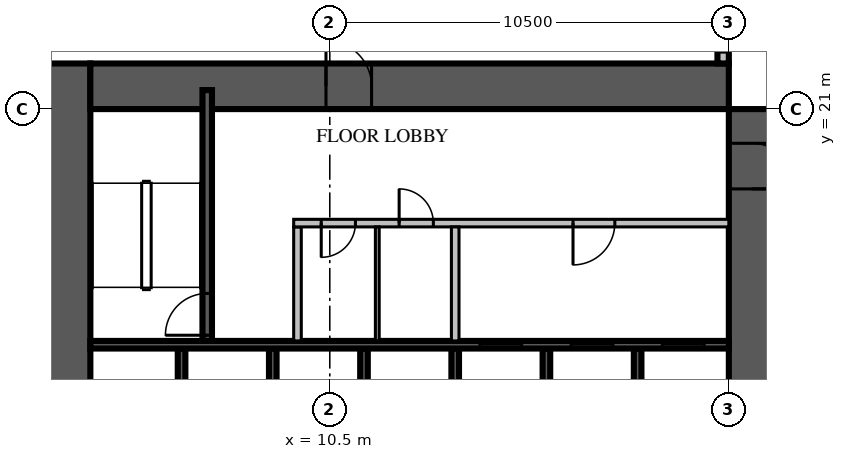
"""IFC4 building model, lengths in metres.
Left out: names, types, materials, properties, quantities, classifications, styles, units other than length and angle.
Written with IfcOpenShell. Run it as: python <this file> out.ifc"""

import sys

from ifc_helpers import new_model, si_unit, direction, frame, frame_2d, origin, place, context, subcontext, project, spatial, rectangle, extrude, source, transform, mapped, element, fill, save


model = new_model("IFC4")
c1 = context("Model", 3, precision=1e-05, world=origin(), true_north=direction((0.0, 1.0)))
c2 = subcontext(c1, "Body", "Model", "MODEL_VIEW")
j1 = project(units=[si_unit("LENGTHUNIT", "METRE"), si_unit("PLANEANGLEUNIT", "RADIAN")], contexts=[c1])
p1 = place(None, origin())
s1 = spatial("IfcSite", under=j1, at=p1, CompositionType="ELEMENT")
p2 = place(p1, origin())
s2 = spatial("IfcBuilding", under=s1, at=p2, CompositionType="ELEMENT")
p3 = place(p2, frame((0.0, 0.0, 48.9)))
s3 = spatial("IfcBuildingStorey", under=s2, at=p3, CompositionType="ELEMENT", Elevation=48.9)
m1 = source(origin(), c2, "Body", "SweptSolid", [
    extrude(rectangle(XDim=18.0, YDim=1.2, at=frame_2d((9.0, 0.0))), origin(), (0.0, 0.0, 1.0), 4.2),
])
p4 = place(p3, frame((3.6, 4.2, 0.0), z_axis=(0.0, 0.0, 1.0), x_axis=(0.0, 1.0, 0.0)))
e1 = element("IfcWall", 1, at=p4, inside=s3, PredefinedType="SHEAR", context=c2, shape_type="MappedRepresentation", body=[
    mapped(m1, transform((0.0, 0.0, 0.0), scale=1.0)),
])
m2 = source(origin(), c2, "Body", "SweptSolid", [
    extrude(rectangle(XDim=2.2, YDim=2.1, at=frame_2d((1.1, 1.05))), frame((0.0, 0.61, 0.0), z_axis=(0.0, -1.0, 0.0), x_axis=(1.0, 0.0, 0.0)), (0.0, 0.0, 1.0), 1.22),
])
p5 = place(p4, frame((4.2, 0.0, 0.0)))
e2 = element("IfcOpeningElement", 2, at=p5, cuts=e1, PredefinedType="OPENING", context=c2, shape_type="MappedRepresentation", body=[
    mapped(m2, transform((0.0, 0.0, 0.0), scale=1.0)),
])
m3 = source(origin(), c2, "Body", "SweptSolid", [
    extrude(rectangle(XDim=16.8, YDim=1.2, at=frame_2d((8.4, 0.0))), origin(), (0.0, 0.0, 1.0), 4.2),
])
p6 = place(p3, frame((21.6, 4.2, 0.0), z_axis=(0.0, 0.0, 1.0), x_axis=(0.0, 1.0, 0.0)))
e3 = element("IfcWall", 3, at=p6, inside=s3, PredefinedType="SHEAR", context=c2, shape_type="MappedRepresentation", body=[
    mapped(m3, transform((0.0, 0.0, 0.0), scale=1.0)),
])
p7 = place(p6, frame((4.2, 0.0, 0.0)))
e4 = element("IfcOpeningElement", 4, at=p7, cuts=e3, PredefinedType="OPENING", context=c2, shape_type="MappedRepresentation", body=[
    mapped(m2, transform((0.0, 0.0, 0.0), scale=1.0)),
])
m4 = source(origin(), c2, "Body", "SweptSolid", [
    extrude(rectangle(XDim=1.2, YDim=2.1, at=frame_2d((0.6, 1.05))), frame((0.0, 0.61, 0.0), z_axis=(0.0, -1.0, 0.0), x_axis=(1.0, 0.0, 0.0)), (0.0, 0.0, 1.0), 1.22),
])
p8 = place(p6, frame((14.7, 0.0, 0.0)))
e5 = element("IfcOpeningElement", 5, at=p8, cuts=e3, PredefinedType="OPENING", context=c2, shape_type="MappedRepresentation", body=[
    mapped(m4, transform((0.0, 0.0, 0.0), scale=1.0)),
])
p9 = place(p3, frame((4.2, 21.6, 0.0), z_axis=(0.0, 0.0, 1.0), x_axis=(1.0, 0.0, 0.0)))
e6 = element("IfcWall", 6, at=p9, inside=s3, PredefinedType="SHEAR", context=c2, shape_type="MappedRepresentation", body=[
    mapped(m3, transform((0.0, 0.0, 0.0), scale=1.0)),
])
p10 = place(p9, frame((6.2, 0.0, 0.0)))
e7 = element("IfcOpeningElement", 7, at=p10, cuts=e6, PredefinedType="OPENING", context=c2, shape_type="MappedRepresentation", body=[
    mapped(m4, transform((0.0, 0.0, 0.0), scale=1.0)),
])
m5 = source(origin(), c2, "Body", "SweptSolid", [
    extrude(rectangle(XDim=6.6, YDim=0.3, at=frame_2d((3.3, 0.0))), origin(), (0.0, 0.0, 1.0), 3.8),
])
p11 = place(p3, frame((20.85, 22.2, 0.0), z_axis=(0.0, 0.0, 1.0), x_axis=(0.0, 1.0, 0.0)))
e8 = element("IfcWall", 8, at=p11, inside=s3, PredefinedType="STANDARD", context=c2, shape_type="MappedRepresentation", body=[
    mapped(m5, transform((0.0, 0.0, 0.0), scale=1.0)),
])
m6 = source(origin(), c2, "Body", "SweptSolid", [
    extrude(rectangle(XDim=1.2, YDim=2.7, at=frame_2d((0.6, 1.35))), frame((0.0, 0.16, 0.0), z_axis=(0.0, -1.0, 0.0), x_axis=(1.0, 0.0, 0.0)), (0.0, 0.0, 1.0), 0.32),
])
p12 = place(p11, frame((0.3, 0.0, 0.6)))
e9 = element("IfcOpeningElement", 9, at=p12, cuts=e8, PredefinedType="OPENING", context=c2, shape_type="MappedRepresentation", body=[
    mapped(m6, transform((0.0, 0.0, 0.0), scale=1.0)),
])
m7 = source(origin(), c2, "Body", "SweptSolid", [
    extrude(rectangle(XDim=2.4, YDim=2.7, at=frame_2d((1.2, 1.35))), frame((0.0, 0.16, 0.0), z_axis=(0.0, -1.0, 0.0), x_axis=(1.0, 0.0, 0.0)), (0.0, 0.0, 1.0), 0.32),
])
p13 = place(p11, frame((3.9, 0.0, 0.6)))
e10 = element("IfcOpeningElement", 10, at=p13, cuts=e8, PredefinedType="OPENING", context=c2, shape_type="MappedRepresentation", body=[
    mapped(m7, transform((0.0, 0.0, 0.0), scale=1.0)),
])
m8 = source(origin(), c2, "Body", "SweptSolid", [
    extrude(rectangle(XDim=3.0, YDim=0.2, at=frame_2d((1.5, 0.0))), origin(), (0.0, 0.0, 1.0), 4.2),
])
for number, where, z_axis, x_axis in (
    (11, (6.6, 11.7, 0.0), (0.0, 0.0, 1.0), (0.0, 1.0, 0.0)),
    (12, (9.0, 11.7, 0.0), (0.0, 0.0, 1.0), (0.0, 1.0, 0.0)),
    (13, (11.4, 11.7, 0.0), (0.0, 0.0, 1.0), (0.0, 1.0, 0.0)),
    (14, (13.8, 11.7, 0.0), (0.0, 0.0, 1.0), (0.0, 1.0, 0.0)),
    (15, (16.2, 11.7, 0.0), (0.0, 0.0, 1.0), (0.0, 1.0, 0.0)),
    (16, (18.6, 11.7, 0.0), (0.0, 0.0, 1.0), (0.0, 1.0, 0.0)),
):
    element("IfcWall", number, at=place(p3, frame(where, z_axis=z_axis, x_axis=x_axis)), inside=s3, PredefinedType="SOLIDWALL", context=c2, shape_type="MappedRepresentation", body=[
        mapped(m8, transform((0.0, 0.0, 0.0), scale=1.0)),
    ])
m9 = source(origin(), c2, "Body", "SweptSolid", [
    extrude(rectangle(XDim=16.8, YDim=0.2, at=frame_2d((8.4, 0.0))), origin(), (0.0, 0.0, 1.0), 4.2),
])
p14 = place(p3, frame((4.2, 14.8, 0.0), z_axis=(0.0, 0.0, 1.0), x_axis=(1.0, 0.0, 0.0)))
e17 = element("IfcWall", 17, at=p14, inside=s3, PredefinedType="SOLIDWALL", context=c2, shape_type="MappedRepresentation", body=[
    mapped(m9, transform((0.0, 0.0, 0.0), scale=1.0)),
])
m10 = source(origin(), c2, "Body", "SweptSolid", [
    extrude(rectangle(XDim=1.1, YDim=2.1, at=frame_2d((0.55, 1.05))), frame((0.0, 0.11, 0.0), z_axis=(0.0, -1.0, 0.0), x_axis=(1.0, 0.0, 0.0)), (0.0, 0.0, 1.0), 0.22),
])
p15 = place(p14, frame((10.25, 0.0, 0.0)))
e18 = element("IfcOpeningElement", 18, at=p15, cuts=e17, PredefinedType="OPENING", context=c2, shape_type="MappedRepresentation", body=[
    mapped(m10, transform((0.0, 0.0, 0.0), scale=1.0)),
])
p16 = place(p14, frame((12.65, 0.0, 0.0)))
e19 = element("IfcOpeningElement", 19, at=p16, cuts=e17, PredefinedType="OPENING", context=c2, shape_type="MappedRepresentation", body=[
    mapped(m10, transform((0.0, 0.0, 0.0), scale=1.0)),
])
p17 = place(p14, frame((15.05, 0.0, 0.0)))
e20 = element("IfcOpeningElement", 20, at=p17, cuts=e17, PredefinedType="OPENING", context=c2, shape_type="MappedRepresentation", body=[
    mapped(m10, transform((0.0, 0.0, 0.0), scale=1.0)),
])
m11 = source(origin(), c2, "Body", "SweptSolid", [
    extrude(rectangle(XDim=6.6, YDim=0.25, at=frame_2d((3.3, 0.0))), origin(), (0.0, 0.0, 1.0), 3.8),
])
p18 = place(p3, frame((7.275, 14.9, 0.0), z_axis=(0.0, 0.0, 1.0), x_axis=(0.0, 1.0, 0.0)))
e21 = element("IfcWall", 21, at=p18, inside=s3, PredefinedType="SOLIDWALL", context=c2, shape_type="MappedRepresentation", body=[
    mapped(m11, transform((0.0, 0.0, 0.0), scale=1.0)),
])
m12 = source(origin(), c2, "Body", "SweptSolid", [
    extrude(rectangle(XDim=1.1, YDim=2.1, at=frame_2d((0.55, 1.05))), frame((0.0, 0.135, 0.0), z_axis=(0.0, -1.0, 0.0), x_axis=(1.0, 0.0, 0.0)), (0.0, 0.0, 1.0), 0.27),
])
p19 = place(p18, frame((0.15, 0.0, 0.0)))
e22 = element("IfcOpeningElement", 22, at=p19, cuts=e21, PredefinedType="OPENING", context=c2, shape_type="MappedRepresentation", body=[
    mapped(m12, transform((0.0, 0.0, 0.0), scale=1.0)),
])
m13 = source(origin(), c2, "Body", "SweptSolid", [
    extrude(rectangle(XDim=3.0, YDim=0.2, at=frame_2d((1.5, 0.0))), origin(), (0.0, 0.0, 1.0), 3.8),
])
p20 = place(p3, frame((9.65, 14.9, 0.0), z_axis=(0.0, 0.0, 1.0), x_axis=(0.0, 1.0, 0.0)))
e23 = element("IfcWall", 23, at=p20, inside=s3, PredefinedType="PARTITIONING", context=c2, shape_type="MappedRepresentation", body=[
    mapped(m13, transform((0.0, 0.0, 0.0), scale=1.0)),
])
m14 = source(origin(), c2, "Body", "SweptSolid", [
    extrude(rectangle(XDim=11.45, YDim=0.2, at=frame_2d((5.725, 0.0))), origin(), (0.0, 0.0, 1.0), 3.8),
])
p21 = place(p3, frame((9.55, 18.0, 0.0), z_axis=(0.0, 0.0, 1.0), x_axis=(1.0, 0.0, 0.0)))
e24 = element("IfcWall", 24, at=p21, inside=s3, PredefinedType="PARTITIONING", context=c2, shape_type="MappedRepresentation", body=[
    mapped(m14, transform((0.0, 0.0, 0.0), scale=1.0)),
])
m15 = source(origin(), c2, "Body", "SweptSolid", [
    extrude(rectangle(XDim=0.9, YDim=2.1, at=frame_2d((0.45, 1.05))), frame((0.0, 0.11, 0.0), z_axis=(0.0, -1.0, 0.0), x_axis=(1.0, 0.0, 0.0)), (0.0, 0.0, 1.0), 0.22),
])
p22 = place(p21, frame((0.725, 0.0, 0.0)))
e25 = element("IfcOpeningElement", 25, at=p22, cuts=e24, PredefinedType="OPENING", context=c2, shape_type="MappedRepresentation", body=[
    mapped(m15, transform((0.0, 0.0, 0.0), scale=1.0)),
])
p23 = place(p21, frame((2.775, 0.0, 0.0)))
e26 = element("IfcOpeningElement", 26, at=p23, cuts=e24, PredefinedType="OPENING", context=c2, shape_type="MappedRepresentation", body=[
    mapped(m15, transform((0.0, 0.0, 0.0), scale=1.0)),
])
p24 = place(p21, frame((7.35, 0.0, 0.0)))
e27 = element("IfcOpeningElement", 27, at=p24, cuts=e24, PredefinedType="OPENING", context=c2, shape_type="MappedRepresentation", body=[
    mapped(m10, transform((0.0, 0.0, 0.0), scale=1.0)),
])
p25 = place(p3, frame((13.8, 14.9, 0.0), z_axis=(0.0, 0.0, 1.0), x_axis=(0.0, 1.0, 0.0)))
e28 = element("IfcWall", 28, at=p25, inside=s3, PredefinedType="PARTITIONING", context=c2, shape_type="MappedRepresentation", body=[
    mapped(m13, transform((0.0, 0.0, 0.0), scale=1.0)),
])
m16 = source(origin(), c2, "Body", "SweptSolid", [
    extrude(rectangle(XDim=3.0, YDim=0.1, at=frame_2d((1.5, 0.0))), origin(), (0.0, 0.0, 1.0), 3.8),
])
p26 = place(p3, frame((11.75, 14.9, 0.0), z_axis=(0.0, 0.0, 1.0), x_axis=(0.0, 1.0, 0.0)))
e29 = element("IfcWall", 29, at=p26, inside=s3, PredefinedType="PARTITIONING", context=c2, shape_type="MappedRepresentation", body=[
    mapped(m16, transform((0.0, 0.0, 0.0), scale=1.0)),
])
m17 = source(origin(), c2, "Body", "SweptSolid", [
    extrude(rectangle(XDim=1.1, YDim=2.1, at=frame_2d((0.55, 1.05))), frame((0.0, 0.025, 0.0), z_axis=(0.0, -1.0, 0.0), x_axis=(1.0, 0.0, 0.0)), (0.0, 0.0, 1.0), 0.05),
])
p27 = place(p15, origin())
e30 = element("IfcDoor", 30, at=p27, inside=s3, OperationType="SLIDING_TO_LEFT", PredefinedType="DOOR", context=c2, shape_type="MappedRepresentation", body=[
    mapped(m17, transform((0.0, 0.0, 0.0), scale=1.0)),
])
fill(e18, e30)
p28 = place(p16, origin())
e31 = element("IfcDoor", 31, at=p28, inside=s3, OperationType="SLIDING_TO_LEFT", PredefinedType="DOOR", context=c2, shape_type="MappedRepresentation", body=[
    mapped(m17, transform((0.0, 0.0, 0.0), scale=1.0)),
])
fill(e19, e31)
p29 = place(p17, origin())
e32 = element("IfcDoor", 32, at=p29, inside=s3, OperationType="SLIDING_TO_LEFT", PredefinedType="DOOR", context=c2, shape_type="MappedRepresentation", body=[
    mapped(m17, transform((0.0, 0.0, 0.0), scale=1.0)),
])
fill(e20, e32)
p30 = place(p19, origin())
e33 = element("IfcDoor", 33, at=p30, inside=s3, OperationType="SINGLE_SWING_LEFT", PredefinedType="DOOR", context=c2, shape_type="MappedRepresentation", body=[
    mapped(m17, transform((0.0, 0.0, 0.0), scale=1.0)),
])
fill(e22, e33)
m18 = source(origin(), c2, "Body", "SweptSolid", [
    extrude(rectangle(XDim=0.9, YDim=2.1, at=frame_2d((0.45, 1.05))), frame((0.0, 0.025, 0.0), z_axis=(0.0, -1.0, 0.0), x_axis=(1.0, 0.0, 0.0)), (0.0, 0.0, 1.0), 0.05),
])
p31 = place(p22, origin())
e34 = element("IfcDoor", 34, at=p31, inside=s3, OperationType="SINGLE_SWING_RIGHT", PredefinedType="DOOR", context=c2, shape_type="MappedRepresentation", body=[
    mapped(m18, transform((0.0, 0.0, 0.0), scale=1.0)),
])
fill(e25, e34)
p32 = place(p23, origin())
e35 = element("IfcDoor", 35, at=p32, inside=s3, OperationType="SINGLE_SWING_LEFT", PredefinedType="DOOR", context=c2, shape_type="MappedRepresentation", body=[
    mapped(m18, transform((0.0, 0.0, 0.0), scale=1.0)),
])
fill(e26, e35)
p33 = place(p24, origin())
e36 = element("IfcDoor", 36, at=p33, inside=s3, OperationType="SINGLE_SWING_RIGHT", PredefinedType="DOOR", context=c2, shape_type="MappedRepresentation", body=[
    mapped(m17, transform((0.0, 0.0, 0.0), scale=1.0)),
])
fill(e27, e36)
m19 = source(origin(), c2, "Body", "SweptSolid", [
    extrude(rectangle(XDim=1.2, YDim=2.1, at=frame_2d((0.6, 1.05))), frame((0.0, 0.025, 0.0), z_axis=(0.0, -1.0, 0.0), x_axis=(1.0, 0.0, 0.0)), (0.0, 0.0, 1.0), 0.05),
])
p34 = place(p10, origin())
e37 = element("IfcDoor", 37, at=p34, inside=s3, OperationType="SINGLE_SWING_LEFT", PredefinedType="DOOR", context=c2, shape_type="MappedRepresentation", body=[
    mapped(m19, transform((0.0, 0.0, 0.0), scale=1.0)),
])
fill(e7, e37)
p35 = place(p8, origin())
e38 = element("IfcDoor", 38, at=p35, inside=s3, OperationType="SINGLE_SWING_RIGHT", PredefinedType="DOOR", context=c2, shape_type="MappedRepresentation", body=[
    mapped(m19, transform((0.0, 0.0, 0.0), scale=1.0)),
])
fill(e5, e38)
save(model, sys.argv[1])
